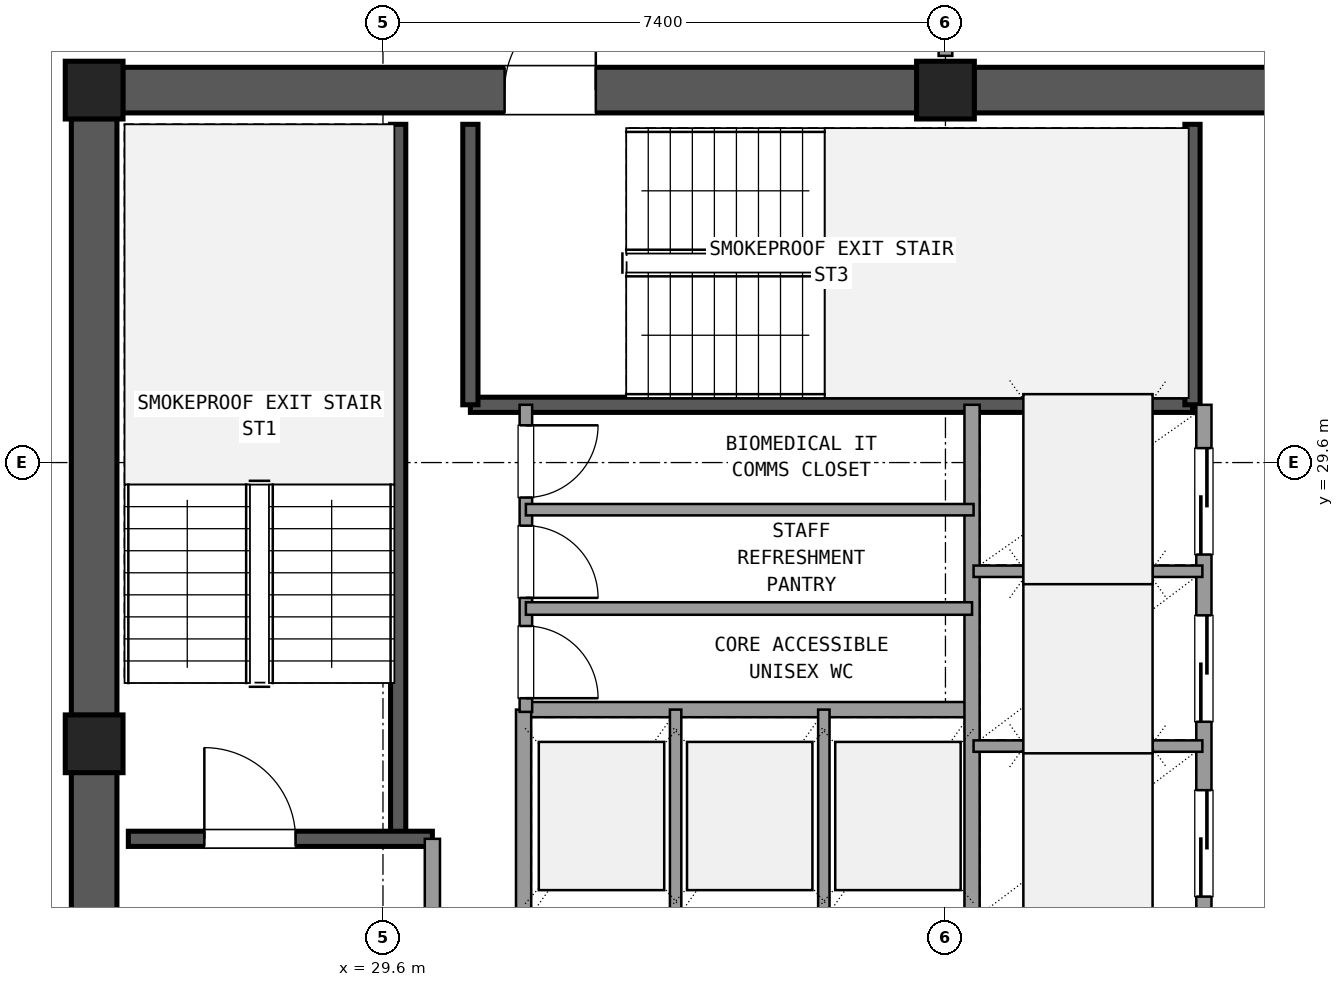
"""IFC4 building model, lengths in metres.
Left out: names, types, materials, properties, quantities, classifications, styles, units other than length and angle.
Written with IfcOpenShell. Run it as: python <this file> out.ifc"""

import sys

from ifc_helpers import new_model, si_unit, direction, frame, frame_2d, origin, origin_2d, place, context, subcontext, project, spatial, rectangle, extrude, element, fill, save


model = new_model("IFC4")
c1 = context("Model", 3, precision=1e-05, world=origin(), true_north=direction((0.0, 1.0)))
c2 = subcontext(c1, "Body", "Model", "MODEL_VIEW")
j1 = project(units=[si_unit("LENGTHUNIT", "METRE"), si_unit("PLANEANGLEUNIT", "RADIAN")], contexts=[c1])
p1 = place(None, origin())
s1 = spatial("IfcSite", under=j1, at=p1, CompositionType="ELEMENT")
p2 = place(p1, origin())
s2 = spatial("IfcBuilding", under=s1, at=p2, CompositionType="ELEMENT")
p3 = place(p2, frame((0.0, 0.0, 275.22)))
s3 = spatial("IfcBuildingStorey", under=s2, at=p3, CompositionType="ELEMENT", Elevation=275.22)
for number, where, z_axis, x_axis in (
    (1, (37.0, 34.5, 0.0), (0.0, 0.0, 1.0), (1.0, 0.0, 0.0)),
    (2, (25.8, 34.5, 0.0), (0.0, 0.0, 1.0), (1.0, 0.0, 0.0)),
    (3, (25.8, 25.9, 0.0), (0.0, 0.0, 1.0), (1.0, 0.0, 0.0)),
):
    element("IfcColumn", number, at=place(p3, frame(where, z_axis=z_axis, x_axis=x_axis)), inside=s3, PredefinedType="COLUMN", context=c2, shape_type="SweptSolid", body=[
        extrude(rectangle(XDim=0.76, YDim=0.76, at=origin_2d()), origin(), (0.0, 0.0, 1.0), 3.6),
    ])
p4 = place(p3, frame((47.825, 34.5, 0.0), z_axis=(0.0, 0.0, 1.0), x_axis=(-1.0, 0.0, 0.0)))
e4 = element("IfcWall", 4, at=p4, inside=s3, PredefinedType="SHEAR", context=c2, shape_type="SweptSolid", body=[
    extrude(rectangle(XDim=10.45, YDim=0.6, at=frame_2d((5.225, 0.0))), origin(), (0.0, 0.0, 1.0), 3.32),
])
p5 = place(p4, frame((4.725, 0.0, 0.0)))
e5 = element("IfcOpeningElement", 5, at=p5, cuts=e4, PredefinedType="OPENING", context=c2, shape_type="SweptSolid", body=[
    extrude(rectangle(XDim=1.6, YDim=2.2, at=frame_2d((0.8, 1.1))), frame((0.0, 0.31, 0.0), z_axis=(0.0, -1.0, 0.0), x_axis=(1.0, 0.0, 0.0)), (0.0, 0.0, 1.0), 0.62),
])
p6 = place(p3, frame((36.625, 34.5, 0.0), z_axis=(0.0, 0.0, 1.0), x_axis=(-1.0, 0.0, 0.0)))
e6 = element("IfcWall", 6, at=p6, inside=s3, PredefinedType="SHEAR", context=c2, shape_type="SweptSolid", body=[
    extrude(rectangle(XDim=10.45, YDim=0.6, at=frame_2d((5.225, 0.0))), origin(), (0.0, 0.0, 1.0), 3.32),
])
p7 = place(p6, frame((4.225, 0.0, 0.0)))
e7 = element("IfcOpeningElement", 7, at=p7, cuts=e6, PredefinedType="OPENING", context=c2, shape_type="SweptSolid", body=[
    extrude(rectangle(XDim=1.2, YDim=2.15, at=frame_2d((0.6, 1.075))), frame((0.0, 0.31, 0.0), z_axis=(0.0, -1.0, 0.0), x_axis=(1.0, 0.0, 0.0)), (0.0, 0.0, 1.0), 0.62),
])
p8 = place(p3, frame((25.8, 34.125, 0.0), z_axis=(0.0, 0.0, 1.0), x_axis=(0.0, -1.0, 0.0)))
e8 = element("IfcWall", 8, at=p8, inside=s3, PredefinedType="SHEAR", context=c2, shape_type="SweptSolid", body=[
    extrude(rectangle(XDim=7.85, YDim=0.6, at=frame_2d((3.925, 0.0))), origin(), (0.0, 0.0, 1.0), 3.32),
])
p9 = place(p3, frame((25.8, 25.525, 0.0), z_axis=(0.0, 0.0, 1.0), x_axis=(0.0, -1.0, 0.0)))
e9 = element("IfcWall", 9, at=p9, inside=s3, PredefinedType="SHEAR", context=c2, shape_type="SweptSolid", body=[
    extrude(rectangle(XDim=7.85, YDim=0.6, at=frame_2d((3.925, 0.0))), origin(), (0.0, 0.0, 1.0), 3.32),
])
p10 = place(p9, frame((2.275, 0.0, 0.0)))
e10 = element("IfcOpeningElement", 10, at=p10, cuts=e9, PredefinedType="OPENING", context=c2, shape_type="SweptSolid", body=[
    extrude(rectangle(XDim=1.2, YDim=2.15, at=frame_2d((0.6, 1.075))), frame((0.0, 0.31, 0.0), z_axis=(0.0, -1.0, 0.0), x_axis=(1.0, 0.0, 0.0)), (0.0, 0.0, 1.0), 0.62),
])
p11 = place(p3, frame((29.8, 24.65, 0.0), z_axis=(0.0, 0.0, 1.0), x_axis=(0.0, 1.0, 0.0)))
e11 = element("IfcWall", 11, at=p11, inside=s3, PredefinedType="SHEAR", context=c2, shape_type="SweptSolid", body=[
    extrude(rectangle(XDim=9.4, YDim=0.2, at=frame_2d((4.7, 0.0))), origin(), (0.0, 0.0, 1.0), 3.32),
])
p12 = place(p3, frame((26.25, 24.65, 0.0), z_axis=(0.0, 0.0, 1.0), x_axis=(1.0, 0.0, 0.0)))
e12 = element("IfcWall", 12, at=p12, inside=s3, PredefinedType="SHEAR", context=c2, shape_type="SweptSolid", body=[
    extrude(rectangle(XDim=4.0, YDim=0.2, at=frame_2d((2.0, 0.0))), origin(), (0.0, 0.0, 1.0), 3.32),
])
p13 = place(p12, frame((1.0, 0.0, 0.0)))
e13 = element("IfcOpeningElement", 13, at=p13, cuts=e12, PredefinedType="OPENING", context=c2, shape_type="SweptSolid", body=[
    extrude(rectangle(XDim=1.2, YDim=2.15, at=frame_2d((0.6, 1.075))), frame((0.0, 0.11, 0.0), z_axis=(0.0, -1.0, 0.0), x_axis=(1.0, 0.0, 0.0)), (0.0, 0.0, 1.0), 0.22),
])
p14 = place(p3, frame((30.75, 30.36, 0.0), z_axis=(0.0, 0.0, 1.0), x_axis=(1.0, 0.0, 0.0)))
e14 = element("IfcWall", 14, at=p14, inside=s3, PredefinedType="SHEAR", context=c2, shape_type="SweptSolid", body=[
    extrude(rectangle(XDim=9.5, YDim=0.2, at=frame_2d((4.75, 0.0))), origin(), (0.0, 0.0, 1.0), 3.32),
])
for number, where, z_axis, x_axis in (
    (15, (30.75, 30.36, 0.0), (0.0, 0.0, 1.0), (0.0, 1.0, 0.0)),
    (16, (40.25, 30.36, 0.0), (0.0, 0.0, 1.0), (0.0, 1.0, 0.0)),
):
    element("IfcWall", number, at=place(p3, frame(where, z_axis=z_axis, x_axis=x_axis)), inside=s3, PredefinedType="SHEAR", context=c2, shape_type="SweptSolid", body=[
        extrude(rectangle(XDim=3.69, YDim=0.2, at=frame_2d((1.845, 0.0))), origin(), (0.0, 0.0, 1.0), 3.32),
    ])
p15 = place(p3, frame((30.25, 17.75, 0.0), z_axis=(0.0, 0.0, 1.0), x_axis=(0.0, 1.0, 0.0)))
e17 = element("IfcWall", 17, at=p15, inside=s3, PredefinedType="SOLIDWALL", context=c2, shape_type="SweptSolid", body=[
    extrude(rectangle(XDim=6.9, YDim=0.2, at=frame_2d((3.45, 0.0))), origin(), (0.0, 0.0, 1.0), 2.61),
])
p16 = place(p15, frame((4.15, 0.0, 0.0)))
e18 = element("IfcOpeningElement", 18, at=p16, cuts=e17, PredefinedType="OPENING", context=c2, shape_type="SweptSolid", body=[
    extrude(rectangle(XDim=1.2, YDim=2.15, at=frame_2d((0.6, 1.075))), frame((0.0, 0.11, 0.0), z_axis=(0.0, -1.0, 0.0), x_axis=(1.0, 0.0, 0.0)), (0.0, 0.0, 1.0), 0.22),
])
p17 = place(p3, frame((31.45, 26.35, 0.0), z_axis=(0.0, 0.0, 1.0), x_axis=(1.0, 0.0, 0.0)))
e19 = element("IfcWall", 19, at=p17, inside=s3, PredefinedType="SOLIDWALL", context=c2, shape_type="SweptSolid", body=[
    extrude(rectangle(XDim=5.9, YDim=0.2, at=frame_2d((2.95, 0.0))), origin(), (0.0, 0.0, 1.0), 2.61),
])
p18 = place(p3, frame((31.45, 23.54, 0.0), z_axis=(0.0, 0.0, 1.0), x_axis=(0.0, 1.0, 0.0)))
e20 = element("IfcWall", 20, at=p18, inside=s3, PredefinedType="SOLIDWALL", context=c2, shape_type="SweptSolid", body=[
    extrude(rectangle(XDim=2.81, YDim=0.2, at=frame_2d((1.405, 0.0))), origin(), (0.0, 0.0, 1.0), 2.61),
])
for number, where, z_axis, x_axis in (
    (21, (33.45, 23.54, 0.0), (0.0, 0.0, 1.0), (0.0, 1.0, 0.0)),
    (22, (35.4, 23.54, 0.0), (0.0, 0.0, 1.0), (0.0, 1.0, 0.0)),
):
    element("IfcWall", number, at=place(p3, frame(where, z_axis=z_axis, x_axis=x_axis)), inside=s3, PredefinedType="PARTITIONING", context=c2, shape_type="SweptSolid", body=[
        extrude(rectangle(XDim=2.81, YDim=0.15, at=frame_2d((1.405, 0.0))), origin(), (0.0, 0.0, 1.0), 2.61),
    ])
p19 = place(p3, frame((37.35, 23.54, 0.0), z_axis=(0.0, 0.0, 1.0), x_axis=(0.0, 1.0, 0.0)))
e23 = element("IfcWall", 23, at=p19, inside=s3, PredefinedType="SOLIDWALL", context=c2, shape_type="SweptSolid", body=[
    extrude(rectangle(XDim=6.82, YDim=0.2, at=frame_2d((3.41, 0.0))), origin(), (0.0, 0.0, 1.0), 2.61),
])
p20 = place(p3, frame((40.4, 23.54, 0.0), z_axis=(0.0, 0.0, 1.0), x_axis=(0.0, 1.0, 0.0)))
e24 = element("IfcWall", 24, at=p20, inside=s3, PredefinedType="SOLIDWALL", context=c2, shape_type="SweptSolid", body=[
    extrude(rectangle(XDim=6.82, YDim=0.2, at=frame_2d((3.41, 0.0))), origin(), (0.0, 0.0, 1.0), 2.61),
])
p21 = place(p20, frame((0.35, 0.0, 0.0)))
e25 = element("IfcOpeningElement", 25, at=p21, cuts=e24, PredefinedType="OPENING", context=c2, shape_type="SweptSolid", body=[
    extrude(rectangle(XDim=1.4, YDim=2.2, at=frame_2d((0.7, 1.1))), frame((0.0, 0.11, 0.0), z_axis=(0.0, -1.0, 0.0), x_axis=(1.0, 0.0, 0.0)), (0.0, 0.0, 1.0), 0.22),
])
p22 = place(p20, frame((2.65, 0.0, 0.0)))
e26 = element("IfcOpeningElement", 26, at=p22, cuts=e24, PredefinedType="OPENING", context=c2, shape_type="SweptSolid", body=[
    extrude(rectangle(XDim=1.4, YDim=2.2, at=frame_2d((0.7, 1.1))), frame((0.0, 0.11, 0.0), z_axis=(0.0, -1.0, 0.0), x_axis=(1.0, 0.0, 0.0)), (0.0, 0.0, 1.0), 0.22),
])
p23 = place(p20, frame((4.85, 0.0, 0.0)))
e27 = element("IfcOpeningElement", 27, at=p23, cuts=e24, PredefinedType="OPENING", context=c2, shape_type="SweptSolid", body=[
    extrude(rectangle(XDim=1.4, YDim=2.2, at=frame_2d((0.7, 1.1))), frame((0.0, 0.11, 0.0), z_axis=(0.0, -1.0, 0.0), x_axis=(1.0, 0.0, 0.0)), (0.0, 0.0, 1.0), 0.22),
])
for number, where, z_axis, x_axis in (
    (28, (37.37, 25.87, 0.0), (0.0, 0.0, 1.0), (1.0, 0.0, 0.0)),
    (29, (37.37, 28.17, 0.0), (0.0, 0.0, 1.0), (1.0, 0.0, 0.0)),
):
    element("IfcWall", number, at=place(p3, frame(where, z_axis=z_axis, x_axis=x_axis)), inside=s3, PredefinedType="PARTITIONING", context=c2, shape_type="SweptSolid", body=[
        extrude(rectangle(XDim=3.01, YDim=0.15, at=frame_2d((1.505, 0.0))), origin(), (0.0, 0.0, 1.0), 2.61),
    ])
p24 = place(p3, frame((31.48, 26.32, 0.0), z_axis=(0.0, 0.0, 1.0), x_axis=(0.0, 1.0, 0.0)))
e30 = element("IfcWall", 30, at=p24, inside=s3, PredefinedType="PLUMBINGWALL", context=c2, shape_type="SweptSolid", body=[
    extrude(rectangle(XDim=4.04, YDim=0.165, at=frame_2d((2.02, 0.0))), origin(), (0.0, 0.0, 1.0), 2.61),
])
p25 = place(p24, frame((0.18, 0.0, 0.0)))
e31 = element("IfcOpeningElement", 31, at=p25, cuts=e30, PredefinedType="OPENING", context=c2, shape_type="SweptSolid", body=[
    extrude(rectangle(XDim=0.95, YDim=2.1, at=frame_2d((0.475, 1.05))), frame((0.0, 0.093, 0.0), z_axis=(0.0, -1.0, 0.0), x_axis=(1.0, 0.0, 0.0)), (0.0, 0.0, 1.0), 0.185),
])
p26 = place(p24, frame((1.5, 0.0, 0.0)))
e32 = element("IfcOpeningElement", 32, at=p26, cuts=e30, PredefinedType="OPENING", context=c2, shape_type="SweptSolid", body=[
    extrude(rectangle(XDim=0.95, YDim=2.1, at=frame_2d((0.475, 1.05))), frame((0.0, 0.093, 0.0), z_axis=(0.0, -1.0, 0.0), x_axis=(1.0, 0.0, 0.0)), (0.0, 0.0, 1.0), 0.185),
])
p27 = place(p24, frame((2.82, 0.0, 0.0)))
e33 = element("IfcOpeningElement", 33, at=p27, cuts=e30, PredefinedType="OPENING", context=c2, shape_type="SweptSolid", body=[
    extrude(rectangle(XDim=0.95, YDim=2.1, at=frame_2d((0.475, 1.05))), frame((0.0, 0.093, 0.0), z_axis=(0.0, -1.0, 0.0), x_axis=(1.0, 0.0, 0.0)), (0.0, 0.0, 1.0), 0.185),
])
p28 = place(p3, frame((31.48, 27.68, 0.0), z_axis=(0.0, 0.0, 1.0), x_axis=(1.0, 0.0, 0.0)))
e34 = element("IfcWall", 34, at=p28, inside=s3, PredefinedType="PLUMBINGWALL", context=c2, shape_type="SweptSolid", body=[
    extrude(rectangle(XDim=5.87, YDim=0.165, at=frame_2d((2.935, 0.0))), origin(), (0.0, 0.0, 1.0), 2.61),
])
p29 = place(p3, frame((31.48, 28.98, 0.0), z_axis=(0.0, 0.0, 1.0), x_axis=(1.0, 0.0, 0.0)))
e35 = element("IfcWall", 35, at=p29, inside=s3, PredefinedType="PARTITIONING", context=c2, shape_type="SweptSolid", body=[
    extrude(rectangle(XDim=5.89, YDim=0.15, at=frame_2d((2.945, 0.0))), origin(), (0.0, 0.0, 1.0), 2.61),
])
p30 = place(p3, frame((37.0, 34.95, 0.0), z_axis=(0.0, 0.0, 1.0), x_axis=(0.0, 1.0, 0.0)))
e36 = element("IfcWall", 36, at=p30, inside=s3, PredefinedType="PARTITIONING", context=c2, shape_type="SweptSolid", body=[
    extrude(rectangle(XDim=2.7, YDim=0.18, at=frame_2d((1.35, 0.0))), origin(), (0.0, 0.0, 1.0), 2.61),
])
p31 = place(p30, frame((0.35, 0.0, 0.0)))
e37 = element("IfcOpeningElement", 37, at=p31, cuts=e36, PredefinedType="OPENING", context=c2, shape_type="SweptSolid", body=[
    extrude(rectangle(XDim=2.0, YDim=2.2, at=frame_2d((1.0, 1.1))), frame((0.0, 0.1, 0.0), z_axis=(0.0, -1.0, 0.0), x_axis=(1.0, 0.0, 0.0)), (0.0, 0.0, 1.0), 0.2),
])
p32 = place(p13, origin())
e38 = element("IfcDoor", 38, at=p32, inside=s3, OperationType="SINGLE_SWING_LEFT", PredefinedType="DOOR", context=c2, shape_type="SweptSolid", body=[
    extrude(rectangle(XDim=1.2, YDim=2.15, at=frame_2d((0.6, 1.075))), frame((0.0, 0.025, 0.0), z_axis=(0.0, -1.0, 0.0), x_axis=(1.0, 0.0, 0.0)), (0.0, 0.0, 1.0), 0.05),
])
fill(e13, e38)
p33 = place(p7, frame((1.2, 0.0, 0.0), z_axis=(0.0, 0.0, 1.0), x_axis=(-1.0, 0.0, 0.0)))
e39 = element("IfcDoor", 39, at=p33, inside=s3, OperationType="SINGLE_SWING_LEFT", PredefinedType="DOOR", context=c2, shape_type="SweptSolid", body=[
    extrude(rectangle(XDim=1.2, YDim=2.15, at=frame_2d((0.6, 1.075))), frame((0.0, 0.025, 0.0), z_axis=(0.0, -1.0, 0.0), x_axis=(1.0, 0.0, 0.0)), (0.0, 0.0, 1.0), 0.05),
])
fill(e7, e39)
p34 = place(p21, origin())
e40 = element("IfcDoor", 40, at=p34, inside=s3, OperationType="SLIDING_TO_LEFT", PredefinedType="DOOR", context=c2, shape_type="SweptSolid", body=[
    extrude(rectangle(XDim=1.4, YDim=2.2, at=frame_2d((0.7, 1.1))), frame((0.0, 0.025, 0.0), z_axis=(0.0, -1.0, 0.0), x_axis=(1.0, 0.0, 0.0)), (0.0, 0.0, 1.0), 0.05),
])
fill(e25, e40)
p35 = place(p22, origin())
e41 = element("IfcDoor", 41, at=p35, inside=s3, OperationType="SLIDING_TO_LEFT", PredefinedType="DOOR", context=c2, shape_type="SweptSolid", body=[
    extrude(rectangle(XDim=1.4, YDim=2.2, at=frame_2d((0.7, 1.1))), frame((0.0, 0.025, 0.0), z_axis=(0.0, -1.0, 0.0), x_axis=(1.0, 0.0, 0.0)), (0.0, 0.0, 1.0), 0.05),
])
fill(e26, e41)
p36 = place(p23, origin())
e42 = element("IfcDoor", 42, at=p36, inside=s3, OperationType="SLIDING_TO_RIGHT", PredefinedType="DOOR", context=c2, shape_type="SweptSolid", body=[
    extrude(rectangle(XDim=1.4, YDim=2.2, at=frame_2d((0.7, 1.1))), frame((0.0, 0.025, 0.0), z_axis=(0.0, -1.0, 0.0), x_axis=(1.0, 0.0, 0.0)), (0.0, 0.0, 1.0), 0.05),
])
fill(e27, e42)
p37 = place(p25, frame((0.95, 0.0, 0.0), z_axis=(0.0, 0.0, 1.0), x_axis=(-1.0, 0.0, 0.0)))
e43 = element("IfcDoor", 43, at=p37, inside=s3, OperationType="SINGLE_SWING_LEFT", PredefinedType="DOOR", context=c2, shape_type="SweptSolid", body=[
    extrude(rectangle(XDim=0.95, YDim=2.1, at=frame_2d((0.475, 1.05))), frame((0.0, 0.025, 0.0), z_axis=(0.0, -1.0, 0.0), x_axis=(1.0, 0.0, 0.0)), (0.0, 0.0, 1.0), 0.05),
])
fill(e31, e43)
p38 = place(p26, frame((0.95, 0.0, 0.0), z_axis=(0.0, 0.0, 1.0), x_axis=(-1.0, 0.0, 0.0)))
e44 = element("IfcDoor", 44, at=p38, inside=s3, OperationType="SINGLE_SWING_LEFT", PredefinedType="DOOR", context=c2, shape_type="SweptSolid", body=[
    extrude(rectangle(XDim=0.95, YDim=2.1, at=frame_2d((0.475, 1.05))), frame((0.0, 0.025, 0.0), z_axis=(0.0, -1.0, 0.0), x_axis=(1.0, 0.0, 0.0)), (0.0, 0.0, 1.0), 0.05),
])
fill(e32, e44)
p39 = place(p27, frame((0.95, 0.0, 0.0), z_axis=(0.0, 0.0, 1.0), x_axis=(-1.0, 0.0, 0.0)))
e45 = element("IfcDoor", 45, at=p39, inside=s3, OperationType="SINGLE_SWING_RIGHT", PredefinedType="DOOR", context=c2, shape_type="SweptSolid", body=[
    extrude(rectangle(XDim=0.95, YDim=2.1, at=frame_2d((0.475, 1.05))), frame((0.0, 0.025, 0.0), z_axis=(0.0, -1.0, 0.0), x_axis=(1.0, 0.0, 0.0)), (0.0, 0.0, 1.0), 0.05),
])
fill(e33, e45)
save(model, sys.argv[1])
